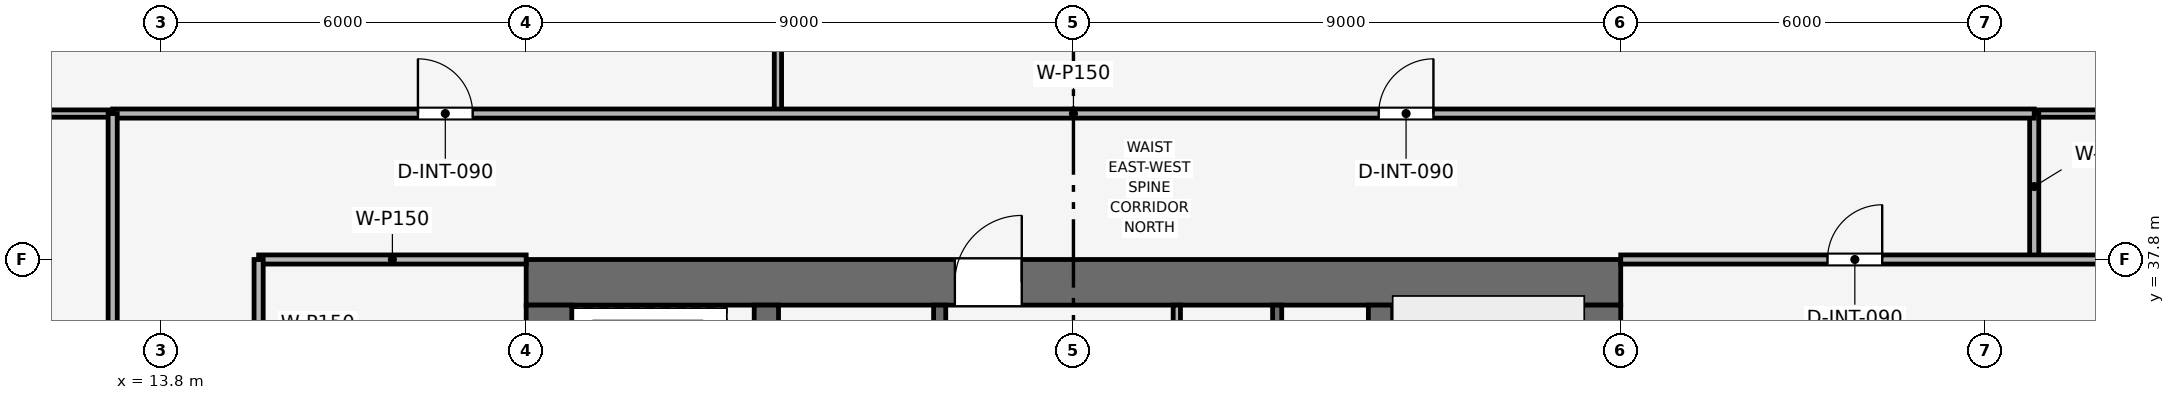
"""IFC4 building model, lengths in metres.
Left out: names, types, materials, properties, quantities, classifications, styles, units other than length and angle.
Written with IfcOpenShell. Run it as: python <this file> out.ifc"""

import sys

from ifc_helpers import new_model, si_unit, direction, frame, frame_2d, origin, place, context, subcontext, project, spatial, rectangle, extrude, element, fill, save


model = new_model("IFC4")
c1 = context("Model", 3, precision=1e-05, world=origin(), true_north=direction((0.0, 1.0)))
c2 = subcontext(c1, "Body", "Model", "MODEL_VIEW")
j1 = project(units=[si_unit("LENGTHUNIT", "METRE"), si_unit("PLANEANGLEUNIT", "RADIAN")], contexts=[c1])
p1 = place(None, origin())
s1 = spatial("IfcSite", under=j1, at=p1, CompositionType="ELEMENT")
p2 = place(p1, origin())
s2 = spatial("IfcBuilding", under=s1, at=p2, CompositionType="ELEMENT")
p3 = place(p2, frame((0.0, 0.0, 207.45)))
s3 = spatial("IfcBuildingStorey", under=s2, at=p3, CompositionType="ELEMENT", Elevation=207.45)
p4 = place(p3, frame((19.8, 37.425, 0.0), z_axis=(0.0, 0.0, 1.0), x_axis=(1.0, 0.0, 0.0)))
e1 = element("IfcWall", 1, at=p4, inside=s3, PredefinedType="SHEAR", context=c2, shape_type="SweptSolid", body=[
    extrude(rectangle(XDim=18.0, YDim=0.75, at=frame_2d((9.0, 0.0))), origin(), (0.0, 0.0, 1.0), 3.75),
])
p5 = place(p4, frame((7.05, 0.0, 0.0)))
e2 = element("IfcOpeningElement", 2, at=p5, cuts=e1, PredefinedType="OPENING", context=c2, shape_type="SweptSolid", body=[
    extrude(rectangle(XDim=1.1, YDim=2.15, at=frame_2d((0.55, 1.075))), frame((0.0, 0.385, 0.0), z_axis=(0.0, -1.0, 0.0), x_axis=(1.0, 0.0, 0.0)), (0.0, 0.0, 1.0), 0.77),
])
p6 = place(p3, frame((20.175, 20.55, 0.0), z_axis=(0.0, 0.0, 1.0), x_axis=(0.0, 1.0, 0.0)))
e3 = element("IfcWall", 3, at=p6, inside=s3, PredefinedType="SHEAR", context=c2, shape_type="SweptSolid", body=[
    extrude(rectangle(XDim=16.5, YDim=0.75, at=frame_2d((8.25, 0.0))), origin(), (0.0, 0.0, 1.0), 3.75),
])
p7 = place(p6, frame((10.25, 0.0, 0.0)))
e4 = element("IfcOpeningElement", 4, at=p7, cuts=e3, PredefinedType="OPENING", context=c2, shape_type="SweptSolid", body=[
    extrude(rectangle(XDim=1.1, YDim=2.15, at=frame_2d((0.55, 1.075))), frame((0.0, 0.385, 0.0), z_axis=(0.0, -1.0, 0.0), x_axis=(1.0, 0.0, 0.0)), (0.0, 0.0, 1.0), 0.77),
])
p8 = place(p3, frame((37.425, 20.55, 0.0), z_axis=(0.0, 0.0, 1.0), x_axis=(0.0, 1.0, 0.0)))
e5 = element("IfcWall", 5, at=p8, inside=s3, PredefinedType="SHEAR", context=c2, shape_type="SweptSolid", body=[
    extrude(rectangle(XDim=16.5, YDim=0.75, at=frame_2d((8.25, 0.0))), origin(), (0.0, 0.0, 1.0), 3.75),
])
p9 = place(p8, frame((4.75, 0.0, 0.0)))
e6 = element("IfcOpeningElement", 6, at=p9, cuts=e5, PredefinedType="OPENING", context=c2, shape_type="SweptSolid", body=[
    extrude(rectangle(XDim=1.1, YDim=2.15, at=frame_2d((0.55, 1.075))), frame((0.0, 0.385, 0.0), z_axis=(0.0, -1.0, 0.0), x_axis=(1.0, 0.0, 0.0)), (0.0, 0.0, 1.0), 0.77),
])
for number, where, z_axis, x_axis in (
    (7, (23.75, 20.55, 0.0), (0.0, 0.0, 1.0), (0.0, 1.0, 0.0)),
    (8, (33.85, 20.55, 0.0), (0.0, 0.0, 1.0), (0.0, 1.0, 0.0)),
):
    element("IfcWall", number, at=place(p3, frame(where, z_axis=z_axis, x_axis=x_axis)), inside=s3, PredefinedType="SHEAR", context=c2, shape_type="SweptSolid", body=[
        extrude(rectangle(XDim=16.5, YDim=0.4, at=frame_2d((8.25, 0.0))), origin(), (0.0, 0.0, 1.0), 3.75),
    ])
p10 = place(p3, frame((32.15, 34.0, 0.0), z_axis=(0.0, 0.0, 1.0), x_axis=(0.0, 1.0, 0.0)))
e9 = element("IfcWall", 9, at=p10, inside=s3, PredefinedType="SHEAR", context=c2, shape_type="SweptSolid", body=[
    extrude(rectangle(XDim=3.05, YDim=0.15, at=frame_2d((1.525, 0.0))), origin(), (0.0, 0.0, 1.0), 3.5),
])
p11 = place(p3, frame((26.6, 34.0, 0.0), z_axis=(0.0, 0.0, 1.0), x_axis=(0.0, 1.0, 0.0)))
e10 = element("IfcWall", 10, at=p11, inside=s3, PredefinedType="SHEAR", context=c2, shape_type="SweptSolid", body=[
    extrude(rectangle(XDim=3.05, YDim=0.2, at=frame_2d((1.525, 0.0))), origin(), (0.0, 0.0, 1.0), 3.5),
])
p12 = place(p11, frame((0.75, 0.0, 0.0)))
e11 = element("IfcOpeningElement", 11, at=p12, cuts=e10, PredefinedType="OPENING", context=c2, shape_type="SweptSolid", body=[
    extrude(rectangle(XDim=1.1, YDim=2.15, at=frame_2d((0.55, 1.075))), frame((0.0, 0.11, 0.0), z_axis=(0.0, -1.0, 0.0), x_axis=(1.0, 0.0, 0.0)), (0.0, 0.0, 1.0), 0.22),
])
p13 = place(p3, frame((30.5, 33.925, 0.0), z_axis=(0.0, 0.0, 1.0), x_axis=(0.0, 1.0, 0.0)))
e12 = element("IfcWall", 12, at=p13, inside=s3, PredefinedType="PARTITIONING", context=c2, shape_type="SweptSolid", body=[
    extrude(rectangle(XDim=3.125, YDim=0.12, at=frame_2d((1.562, 0.0))), origin(), (0.0, 0.0, 1.0), 3.5),
])
p14 = place(p13, frame((0.85, 0.0, 0.0)))
e13 = element("IfcOpeningElement", 13, at=p14, cuts=e12, PredefinedType="OPENING", context=c2, shape_type="SweptSolid", body=[
    extrude(rectangle(XDim=0.9, YDim=2.1, at=frame_2d((0.45, 1.05))), frame((0.0, 0.07, 0.0), z_axis=(0.0, -1.0, 0.0), x_axis=(1.0, 0.0, 0.0)), (0.0, 0.0, 1.0), 0.14),
])
p15 = place(p3, frame((15.4, 37.8, 0.0), z_axis=(0.0, 0.0, 1.0), x_axis=(1.0, 0.0, 0.0)))
e14 = element("IfcWall", 14, at=p15, inside=s3, PredefinedType="PARTITIONING", context=c2, shape_type="SweptSolid", body=[
    extrude(rectangle(XDim=4.4, YDim=0.15, at=frame_2d((2.2, 0.0))), origin(), (0.0, 0.0, 1.0), 3.035),
])
p16 = place(p3, frame((15.4, 32.45, 0.0), z_axis=(0.0, 0.0, 1.0), x_axis=(0.0, 1.0, 0.0)))
e15 = element("IfcWall", 15, at=p16, inside=s3, PredefinedType="PARTITIONING", context=c2, shape_type="SweptSolid", body=[
    extrude(rectangle(XDim=5.35, YDim=0.15, at=frame_2d((2.675, 0.0))), origin(), (0.0, 0.0, 1.0), 3.035),
])
p17 = place(p16, frame((2.1, 0.0, 0.0)))
e16 = element("IfcOpeningElement", 16, at=p17, cuts=e15, PredefinedType="OPENING", context=c2, shape_type="SweptSolid", body=[
    extrude(rectangle(XDim=0.9, YDim=2.1, at=frame_2d((0.45, 1.05))), frame((0.0, 0.085, 0.0), z_axis=(0.0, -1.0, 0.0), x_axis=(1.0, 0.0, 0.0)), (0.0, 0.0, 1.0), 0.17),
])
p18 = place(p3, frame((23.94, 40.2, 0.0), z_axis=(0.0, 0.0, 1.0), x_axis=(0.0, 1.0, 0.0)))
e17 = element("IfcWall", 17, at=p18, inside=s3, PredefinedType="PARTITIONING", context=c2, shape_type="SweptSolid", body=[
    extrude(rectangle(XDim=15.47, YDim=0.12, at=frame_2d((7.735, 0.0))), origin(), (0.0, 0.0, 1.0), 2.885),
])
p19 = place(p3, frame((1.93, 40.2, 0.0), z_axis=(0.0, 0.0, 1.0), x_axis=(1.0, 0.0, 0.0)))
e18 = element("IfcWall", 18, at=p19, inside=s3, PredefinedType="PARTITIONING", context=c2, shape_type="SweptSolid", body=[
    extrude(rectangle(XDim=11.07, YDim=0.12, at=frame_2d((5.535, 0.0))), origin(), (0.0, 0.0, 1.0), 2.885),
])
p20 = place(p3, frame((44.6, 40.2, 0.0), z_axis=(0.0, 0.0, 1.0), x_axis=(1.0, 0.0, 0.0)))
e19 = element("IfcWall", 19, at=p20, inside=s3, PredefinedType="PARTITIONING", context=c2, shape_type="SweptSolid", body=[
    extrude(rectangle(XDim=11.07, YDim=0.12, at=frame_2d((5.535, 0.0))), origin(), (0.0, 0.0, 1.0), 2.885),
])
p21 = place(p3, frame((44.6, 37.8, 0.0), z_axis=(0.0, 0.0, 1.0), x_axis=(0.0, 1.0, 0.0)))
e20 = element("IfcWall", 20, at=p21, inside=s3, PredefinedType="PARTITIONING", context=c2, shape_type="SweptSolid", body=[
    extrude(rectangle(XDim=2.4, YDim=0.15, at=frame_2d((1.2, 0.0))), origin(), (0.0, 0.0, 1.0), 3.5),
])
p22 = place(p3, frame((37.8, 37.8, 0.0), z_axis=(0.0, 0.0, 1.0), x_axis=(1.0, 0.0, 0.0)))
e21 = element("IfcWall", 21, at=p22, inside=s3, PredefinedType="PARTITIONING", context=c2, shape_type="SweptSolid", body=[
    extrude(rectangle(XDim=17.87, YDim=0.15, at=frame_2d((8.935, 0.0))), origin(), (0.0, 0.0, 1.0), 2.885),
])
p23 = place(p22, frame((3.4, 0.0, 0.0)))
e22 = element("IfcOpeningElement", 22, at=p23, cuts=e21, PredefinedType="OPENING", context=c2, shape_type="SweptSolid", body=[
    extrude(rectangle(XDim=0.9, YDim=2.1, at=frame_2d((0.45, 1.05))), frame((0.0, 0.085, 0.0), z_axis=(0.0, -1.0, 0.0), x_axis=(1.0, 0.0, 0.0)), (0.0, 0.0, 1.0), 0.17),
])
p24 = place(p3, frame((13.0, 40.2, 0.0), z_axis=(0.0, 0.0, 1.0), x_axis=(1.0, 0.0, 0.0)))
e23 = element("IfcWall", 23, at=p24, inside=s3, PredefinedType="PARTITIONING", context=c2, shape_type="SweptSolid", body=[
    extrude(rectangle(XDim=31.6, YDim=0.15, at=frame_2d((15.8, 0.0))), origin(), (0.0, 0.0, 1.0), 3.035),
])
p25 = place(p24, frame((5.02, 0.0, 0.0)))
e24 = element("IfcOpeningElement", 24, at=p25, cuts=e23, PredefinedType="OPENING", context=c2, shape_type="SweptSolid", body=[
    extrude(rectangle(XDim=0.9, YDim=2.1, at=frame_2d((0.45, 1.05))), frame((0.0, 0.085, 0.0), z_axis=(0.0, -1.0, 0.0), x_axis=(1.0, 0.0, 0.0)), (0.0, 0.0, 1.0), 0.17),
])
p26 = place(p24, frame((20.82, 0.0, 0.0)))
e25 = element("IfcOpeningElement", 25, at=p26, cuts=e23, PredefinedType="OPENING", context=c2, shape_type="SweptSolid", body=[
    extrude(rectangle(XDim=0.9, YDim=2.1, at=frame_2d((0.45, 1.05))), frame((0.0, 0.085, 0.0), z_axis=(0.0, -1.0, 0.0), x_axis=(1.0, 0.0, 0.0)), (0.0, 0.0, 1.0), 0.17),
])
p27 = place(p3, frame((13.0, 17.4, 0.0), z_axis=(0.0, 0.0, 1.0), x_axis=(0.0, 1.0, 0.0)))
e26 = element("IfcWall", 26, at=p27, inside=s3, PredefinedType="PARTITIONING", context=c2, shape_type="SweptSolid", body=[
    extrude(rectangle(XDim=22.8, YDim=0.15, at=frame_2d((11.4, 0.0))), origin(), (0.0, 0.0, 1.0), 3.035),
])
p28 = place(p27, frame((3.1, 0.0, 0.0)))
e27 = element("IfcOpeningElement", 27, at=p28, cuts=e26, PredefinedType="OPENING", context=c2, shape_type="SweptSolid", body=[
    extrude(rectangle(XDim=0.9, YDim=2.1, at=frame_2d((0.45, 1.05))), frame((0.0, 0.085, 0.0), z_axis=(0.0, -1.0, 0.0), x_axis=(1.0, 0.0, 0.0)), (0.0, 0.0, 1.0), 0.17),
])
p29 = place(p27, frame((7.685, 0.0, 0.0)))
e28 = element("IfcOpeningElement", 28, at=p29, cuts=e26, PredefinedType="OPENING", context=c2, shape_type="SweptSolid", body=[
    extrude(rectangle(XDim=0.9, YDim=2.1, at=frame_2d((0.45, 1.05))), frame((0.0, 0.085, 0.0), z_axis=(0.0, -1.0, 0.0), x_axis=(1.0, 0.0, 0.0)), (0.0, 0.0, 1.0), 0.17),
])
p30 = place(p27, frame((15.535, 0.0, 0.0)))
e29 = element("IfcOpeningElement", 29, at=p30, cuts=e26, PredefinedType="OPENING", context=c2, shape_type="SweptSolid", body=[
    extrude(rectangle(XDim=0.9, YDim=2.1, at=frame_2d((0.45, 1.05))), frame((0.0, 0.085, 0.0), z_axis=(0.0, -1.0, 0.0), x_axis=(1.0, 0.0, 0.0)), (0.0, 0.0, 1.0), 0.17),
])
p31 = place(p23, origin())
e30 = element("IfcDoor", 30, at=p31, inside=s3, OperationType="SINGLE_SWING_RIGHT", PredefinedType="DOOR", context=c2, shape_type="SweptSolid", body=[
    extrude(rectangle(XDim=0.9, YDim=2.1, at=frame_2d((0.45, 1.05))), frame((0.0, 0.025, 0.0), z_axis=(0.0, -1.0, 0.0), x_axis=(1.0, 0.0, 0.0)), (0.0, 0.0, 1.0), 0.05),
])
fill(e22, e30)
p32 = place(p25, origin())
e31 = element("IfcDoor", 31, at=p32, inside=s3, OperationType="SINGLE_SWING_LEFT", PredefinedType="DOOR", context=c2, shape_type="SweptSolid", body=[
    extrude(rectangle(XDim=0.9, YDim=2.1, at=frame_2d((0.45, 1.05))), frame((0.0, 0.025, 0.0), z_axis=(0.0, -1.0, 0.0), x_axis=(1.0, 0.0, 0.0)), (0.0, 0.0, 1.0), 0.05),
])
fill(e24, e31)
p33 = place(p26, origin())
e32 = element("IfcDoor", 32, at=p33, inside=s3, OperationType="SINGLE_SWING_RIGHT", PredefinedType="DOOR", context=c2, shape_type="SweptSolid", body=[
    extrude(rectangle(XDim=0.9, YDim=2.1, at=frame_2d((0.45, 1.05))), frame((0.0, 0.025, 0.0), z_axis=(0.0, -1.0, 0.0), x_axis=(1.0, 0.0, 0.0)), (0.0, 0.0, 1.0), 0.05),
])
fill(e25, e32)
p34 = place(p5, origin())
e33 = element("IfcDoor", 33, at=p34, inside=s3, OperationType="SINGLE_SWING_RIGHT", PredefinedType="DOOR", context=c2, shape_type="SweptSolid", body=[
    extrude(rectangle(XDim=1.1, YDim=2.15, at=frame_2d((0.55, 1.075))), frame((0.0, 0.025, 0.0), z_axis=(0.0, -1.0, 0.0), x_axis=(1.0, 0.0, 0.0)), (0.0, 0.0, 1.0), 0.05),
])
fill(e2, e33)
save(model, sys.argv[1])
